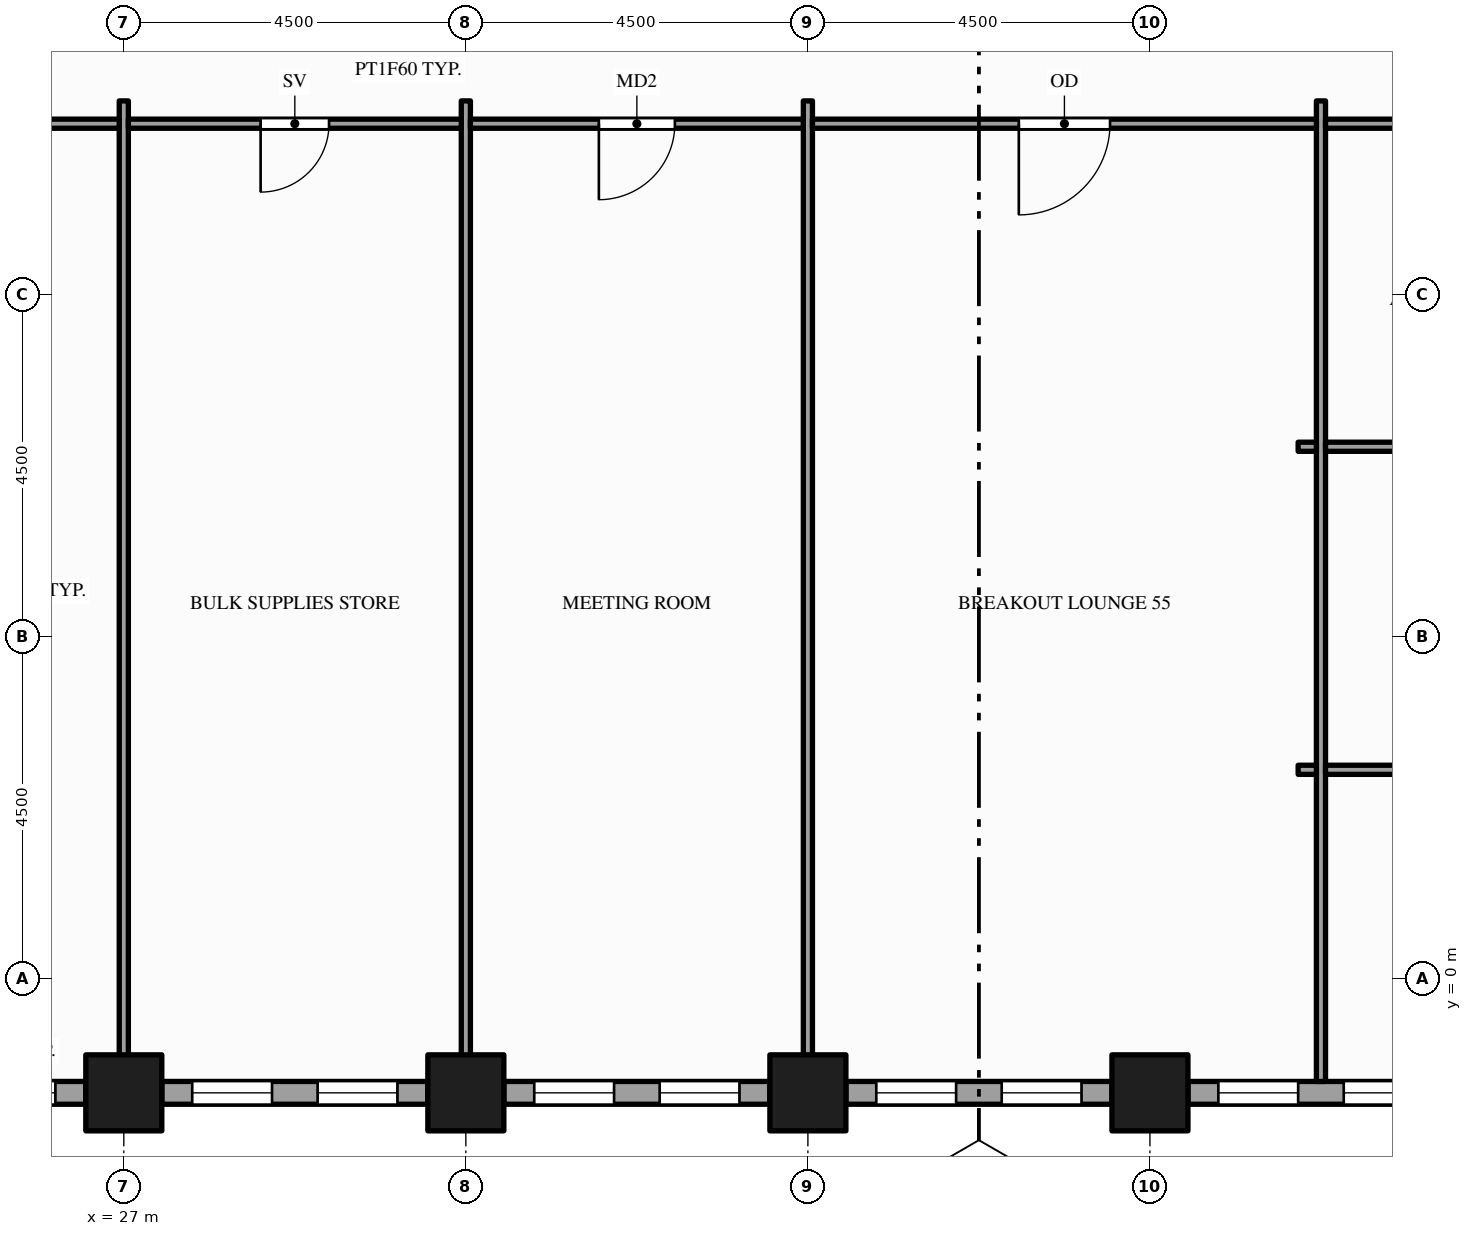
"""IFC4 building model, lengths in metres.
Left out: names, types, materials, properties, quantities, classifications, styles, units other than length and angle.
Written with IfcOpenShell. Run it as: python <this file> out.ifc"""

import sys

from ifc_helpers import new_model, si_unit, direction, frame, frame_2d, origin, origin_2d, place, context, subcontext, project, spatial, rectangle, hollow_rectangle, extrude, element, fill, save


model = new_model("IFC4")
c1 = context("Model", 3, precision=1e-05, world=origin(), true_north=direction((0.0, 1.0)))
c2 = subcontext(c1, "Body", "Model", "MODEL_VIEW")
j1 = project(units=[si_unit("LENGTHUNIT", "METRE"), si_unit("PLANEANGLEUNIT", "RADIAN")], contexts=[c1])
p1 = place(None, origin())
s1 = spatial("IfcSite", under=j1, at=p1, CompositionType="ELEMENT")
p2 = place(p1, origin())
s2 = spatial("IfcBuilding", under=s1, at=p2, CompositionType="ELEMENT")
p3 = place(p2, frame((0.0, 0.0, 83.0)))
s3 = spatial("IfcBuildingStorey", under=s2, at=p3, CompositionType="ELEMENT", Elevation=83.0)
for number, where, z_axis, x_axis in (
    (1, (27.0, -1.5, -0.15), (0.0, 0.0, 1.0), (1.0, 0.0, 0.0)),
    (2, (31.5, -1.5, -0.15), (0.0, 0.0, 1.0), (1.0, 0.0, 0.0)),
    (3, (36.0, -1.5, -0.15), (0.0, 0.0, 1.0), (1.0, 0.0, 0.0)),
    (4, (40.5, -1.5, -0.15), (0.0, 0.0, 1.0), (1.0, 0.0, 0.0)),
):
    element("IfcColumn", number, at=place(p3, frame(where, z_axis=z_axis, x_axis=x_axis)), inside=s3, PredefinedType="COLUMN", context=c2, shape_type="SweptSolid", body=[
        extrude(hollow_rectangle(XDim=1.0, YDim=1.0, WallThickness=0.05, at=origin_2d()), origin(), (0.0, 0.0, 1.0), 4.0),
    ])
p4 = place(p3, frame((23.0, -1.5, 0.0), z_axis=(0.0, 0.0, 1.0), x_axis=(1.0, 0.0, 0.0)))
e5 = element("IfcWall", 5, at=p4, inside=s3, PredefinedType="STANDARD", context=c2, shape_type="SweptSolid", body=[
    extrude(rectangle(XDim=3.5, YDim=0.3, at=frame_2d((1.75, 0.0))), origin(), (0.0, 0.0, 1.0), 3.154),
])
p5 = place(p4, frame((0.4, 0.0, 0.9)))
e6 = element("IfcOpeningElement", 6, at=p5, cuts=e5, PredefinedType="OPENING", context=c2, shape_type="SweptSolid", body=[
    extrude(rectangle(XDim=1.05, YDim=2.0, at=frame_2d((0.525, 1.0))), frame((0.0, 0.16, 0.0), z_axis=(0.0, -1.0, 0.0), x_axis=(1.0, 0.0, 0.0)), (0.0, 0.0, 1.0), 0.32),
])
p6 = place(p4, frame((2.05, 0.0, 0.9)))
e7 = element("IfcOpeningElement", 7, at=p6, cuts=e5, PredefinedType="OPENING", context=c2, shape_type="SweptSolid", body=[
    extrude(rectangle(XDim=1.05, YDim=2.0, at=frame_2d((0.525, 1.0))), frame((0.0, 0.16, 0.0), z_axis=(0.0, -1.0, 0.0), x_axis=(1.0, 0.0, 0.0)), (0.0, 0.0, 1.0), 0.32),
])
p7 = place(p3, frame((27.5, -1.5, 0.0), z_axis=(0.0, 0.0, 1.0), x_axis=(1.0, 0.0, 0.0)))
e8 = element("IfcWall", 8, at=p7, inside=s3, PredefinedType="STANDARD", context=c2, shape_type="SweptSolid", body=[
    extrude(rectangle(XDim=3.5, YDim=0.3, at=frame_2d((1.75, 0.0))), origin(), (0.0, 0.0, 1.0), 3.154),
])
p8 = place(p7, frame((0.4, 0.0, 0.9)))
e9 = element("IfcOpeningElement", 9, at=p8, cuts=e8, PredefinedType="OPENING", context=c2, shape_type="SweptSolid", body=[
    extrude(rectangle(XDim=1.05, YDim=2.0, at=frame_2d((0.525, 1.0))), frame((0.0, 0.16, 0.0), z_axis=(0.0, -1.0, 0.0), x_axis=(1.0, 0.0, 0.0)), (0.0, 0.0, 1.0), 0.32),
])
p9 = place(p7, frame((2.05, 0.0, 0.9)))
e10 = element("IfcOpeningElement", 10, at=p9, cuts=e8, PredefinedType="OPENING", context=c2, shape_type="SweptSolid", body=[
    extrude(rectangle(XDim=1.05, YDim=2.0, at=frame_2d((0.525, 1.0))), frame((0.0, 0.16, 0.0), z_axis=(0.0, -1.0, 0.0), x_axis=(1.0, 0.0, 0.0)), (0.0, 0.0, 1.0), 0.32),
])
p10 = place(p3, frame((32.0, -1.5, 0.0), z_axis=(0.0, 0.0, 1.0), x_axis=(1.0, 0.0, 0.0)))
e11 = element("IfcWall", 11, at=p10, inside=s3, PredefinedType="STANDARD", context=c2, shape_type="SweptSolid", body=[
    extrude(rectangle(XDim=3.5, YDim=0.3, at=frame_2d((1.75, 0.0))), origin(), (0.0, 0.0, 1.0), 3.154),
])
p11 = place(p10, frame((0.4, 0.0, 0.9)))
e12 = element("IfcOpeningElement", 12, at=p11, cuts=e11, PredefinedType="OPENING", context=c2, shape_type="SweptSolid", body=[
    extrude(rectangle(XDim=1.05, YDim=2.0, at=frame_2d((0.525, 1.0))), frame((0.0, 0.16, 0.0), z_axis=(0.0, -1.0, 0.0), x_axis=(1.0, 0.0, 0.0)), (0.0, 0.0, 1.0), 0.32),
])
p12 = place(p10, frame((2.05, 0.0, 0.9)))
e13 = element("IfcOpeningElement", 13, at=p12, cuts=e11, PredefinedType="OPENING", context=c2, shape_type="SweptSolid", body=[
    extrude(rectangle(XDim=1.05, YDim=2.0, at=frame_2d((0.525, 1.0))), frame((0.0, 0.16, 0.0), z_axis=(0.0, -1.0, 0.0), x_axis=(1.0, 0.0, 0.0)), (0.0, 0.0, 1.0), 0.32),
])
p13 = place(p3, frame((36.5, -1.5, 0.0), z_axis=(0.0, 0.0, 1.0), x_axis=(1.0, 0.0, 0.0)))
e14 = element("IfcWall", 14, at=p13, inside=s3, PredefinedType="STANDARD", context=c2, shape_type="SweptSolid", body=[
    extrude(rectangle(XDim=3.5, YDim=0.3, at=frame_2d((1.75, 0.0))), origin(), (0.0, 0.0, 1.0), 3.154),
])
p14 = place(p13, frame((0.4, 0.0, 0.9)))
e15 = element("IfcOpeningElement", 15, at=p14, cuts=e14, PredefinedType="OPENING", context=c2, shape_type="SweptSolid", body=[
    extrude(rectangle(XDim=1.05, YDim=2.0, at=frame_2d((0.525, 1.0))), frame((0.0, 0.16, 0.0), z_axis=(0.0, -1.0, 0.0), x_axis=(1.0, 0.0, 0.0)), (0.0, 0.0, 1.0), 0.32),
])
p15 = place(p13, frame((2.05, 0.0, 0.9)))
e16 = element("IfcOpeningElement", 16, at=p15, cuts=e14, PredefinedType="OPENING", context=c2, shape_type="SweptSolid", body=[
    extrude(rectangle(XDim=1.05, YDim=2.0, at=frame_2d((0.525, 1.0))), frame((0.0, 0.16, 0.0), z_axis=(0.0, -1.0, 0.0), x_axis=(1.0, 0.0, 0.0)), (0.0, 0.0, 1.0), 0.32),
])
p16 = place(p3, frame((41.0, -1.5, 0.0), z_axis=(0.0, 0.0, 1.0), x_axis=(1.0, 0.0, 0.0)))
e17 = element("IfcWall", 17, at=p16, inside=s3, PredefinedType="STANDARD", context=c2, shape_type="SweptSolid", body=[
    extrude(rectangle(XDim=3.5, YDim=0.3, at=frame_2d((1.75, 0.0))), origin(), (0.0, 0.0, 1.0), 3.154),
])
p17 = place(p16, frame((0.4, 0.0, 0.9)))
e18 = element("IfcOpeningElement", 18, at=p17, cuts=e17, PredefinedType="OPENING", context=c2, shape_type="SweptSolid", body=[
    extrude(rectangle(XDim=1.05, YDim=2.0, at=frame_2d((0.525, 1.0))), frame((0.0, 0.16, 0.0), z_axis=(0.0, -1.0, 0.0), x_axis=(1.0, 0.0, 0.0)), (0.0, 0.0, 1.0), 0.32),
])
p18 = place(p16, frame((2.05, 0.0, 0.9)))
e19 = element("IfcOpeningElement", 19, at=p18, cuts=e17, PredefinedType="OPENING", context=c2, shape_type="SweptSolid", body=[
    extrude(rectangle(XDim=1.05, YDim=2.0, at=frame_2d((0.525, 1.0))), frame((0.0, 0.16, 0.0), z_axis=(0.0, -1.0, 0.0), x_axis=(1.0, 0.0, 0.0)), (0.0, 0.0, 1.0), 0.32),
])
for number, where, z_axis, x_axis in (
    (20, (27.0, -1.35, 0.0), (0.0, 0.0, 1.0), (0.0, 1.0, 0.0)),
    (21, (31.5, -1.35, 0.0), (0.0, 0.0, 1.0), (0.0, 1.0, 0.0)),
    (22, (36.0, -1.35, 0.0), (0.0, 0.0, 1.0), (0.0, 1.0, 0.0)),
    (23, (42.75, -1.35, 0.0), (0.0, 0.0, 1.0), (0.0, 1.0, 0.0)),
):
    element("IfcWall", number, at=place(p3, frame(where, z_axis=z_axis, x_axis=x_axis)), inside=s3, PredefinedType="PARTITIONING", context=c2, shape_type="SweptSolid", body=[
        extrude(rectangle(XDim=12.9, YDim=0.12, at=frame_2d((6.45, 0.0))), origin(), (0.0, 0.0, 1.0), 2.938),
    ])
p19 = place(p3, frame((42.45, 2.75, 0.0), z_axis=(0.0, 0.0, 1.0), x_axis=(1.0, 0.0, 0.0)))
e24 = element("IfcWall", 24, at=p19, inside=s3, PredefinedType="PARTITIONING", context=c2, shape_type="SweptSolid", body=[
    extrude(rectangle(XDim=0.24, YDim=0.12, at=frame_2d((0.12, 0.0))), origin(), (0.0, 0.0, 1.0), 2.938),
])
p20 = place(p3, frame((42.81, 2.75, 0.0), z_axis=(0.0, 0.0, 1.0), x_axis=(1.0, 0.0, 0.0)))
e25 = element("IfcWall", 25, at=p20, inside=s3, PredefinedType="PARTITIONING", context=c2, shape_type="SweptSolid", body=[
    extrude(rectangle(XDim=4.38, YDim=0.12, at=frame_2d((2.19, 0.0))), origin(), (0.0, 0.0, 1.0), 2.938),
])
p21 = place(p3, frame((42.45, 7.0, 0.0), z_axis=(0.0, 0.0, 1.0), x_axis=(1.0, 0.0, 0.0)))
e26 = element("IfcWall", 26, at=p21, inside=s3, PredefinedType="PARTITIONING", context=c2, shape_type="SweptSolid", body=[
    extrude(rectangle(XDim=0.24, YDim=0.12, at=frame_2d((0.12, 0.0))), origin(), (0.0, 0.0, 1.0), 2.938),
])
p22 = place(p3, frame((42.81, 7.0, 0.0), z_axis=(0.0, 0.0, 1.0), x_axis=(1.0, 0.0, 0.0)))
e27 = element("IfcWall", 27, at=p22, inside=s3, PredefinedType="PARTITIONING", context=c2, shape_type="SweptSolid", body=[
    extrude(rectangle(XDim=4.38, YDim=0.12, at=frame_2d((2.19, 0.0))), origin(), (0.0, 0.0, 1.0), 2.938),
])
p23 = place(p3, frame((22.56, 11.25, 0.0), z_axis=(0.0, 0.0, 1.0), x_axis=(1.0, 0.0, 0.0)))
e28 = element("IfcWall", 28, at=p23, inside=s3, PredefinedType="PARTITIONING", context=c2, shape_type="SweptSolid", body=[
    extrude(rectangle(XDim=4.38, YDim=0.12, at=frame_2d((2.19, 0.0))), origin(), (0.0, 0.0, 1.0), 2.76),
])
p24 = place(p23, frame((1.69, 0.0, 0.0)))
e29 = element("IfcOpeningElement", 29, at=p24, cuts=e28, PredefinedType="OPENING", context=c2, shape_type="SweptSolid", body=[
    extrude(rectangle(XDim=1.0, YDim=2.1, at=frame_2d((0.5, 1.05))), frame((0.0, 0.07, 0.0), z_axis=(0.0, -1.0, 0.0), x_axis=(1.0, 0.0, 0.0)), (0.0, 0.0, 1.0), 0.14),
])
p25 = place(p3, frame((27.06, 11.25, 0.0), z_axis=(0.0, 0.0, 1.0), x_axis=(1.0, 0.0, 0.0)))
e30 = element("IfcWall", 30, at=p25, inside=s3, PredefinedType="PARTITIONING", context=c2, shape_type="SweptSolid", body=[
    extrude(rectangle(XDim=4.38, YDim=0.12, at=frame_2d((2.19, 0.0))), origin(), (0.0, 0.0, 1.0), 2.938),
])
p26 = place(p25, frame((1.74, 0.0, 0.0)))
e31 = element("IfcOpeningElement", 31, at=p26, cuts=e30, PredefinedType="OPENING", context=c2, shape_type="SweptSolid", body=[
    extrude(rectangle(XDim=0.9, YDim=2.1, at=frame_2d((0.45, 1.05))), frame((0.0, 0.07, 0.0), z_axis=(0.0, -1.0, 0.0), x_axis=(1.0, 0.0, 0.0)), (0.0, 0.0, 1.0), 0.14),
])
p27 = place(p3, frame((31.56, 11.25, 0.0), z_axis=(0.0, 0.0, 1.0), x_axis=(1.0, 0.0, 0.0)))
e32 = element("IfcWall", 32, at=p27, inside=s3, PredefinedType="PARTITIONING", context=c2, shape_type="SweptSolid", body=[
    extrude(rectangle(XDim=4.38, YDim=0.12, at=frame_2d((2.19, 0.0))), origin(), (0.0, 0.0, 1.0), 2.938),
])
p28 = place(p27, frame((1.69, 0.0, 0.0)))
e33 = element("IfcOpeningElement", 33, at=p28, cuts=e32, PredefinedType="OPENING", context=c2, shape_type="SweptSolid", body=[
    extrude(rectangle(XDim=1.0, YDim=2.1, at=frame_2d((0.5, 1.05))), frame((0.0, 0.07, 0.0), z_axis=(0.0, -1.0, 0.0), x_axis=(1.0, 0.0, 0.0)), (0.0, 0.0, 1.0), 0.14),
])
p29 = place(p3, frame((36.06, 11.25, 0.0), z_axis=(0.0, 0.0, 1.0), x_axis=(1.0, 0.0, 0.0)))
e34 = element("IfcWall", 34, at=p29, inside=s3, PredefinedType="PARTITIONING", context=c2, shape_type="SweptSolid", body=[
    extrude(rectangle(XDim=6.63, YDim=0.12, at=frame_2d((3.315, 0.0))), origin(), (0.0, 0.0, 1.0), 2.938),
])
p30 = place(p29, frame((2.715, 0.0, 0.0)))
e35 = element("IfcOpeningElement", 35, at=p30, cuts=e34, PredefinedType="OPENING", context=c2, shape_type="SweptSolid", body=[
    extrude(rectangle(XDim=1.2, YDim=2.1, at=frame_2d((0.6, 1.05))), frame((0.0, 0.07, 0.0), z_axis=(0.0, -1.0, 0.0), x_axis=(1.0, 0.0, 0.0)), (0.0, 0.0, 1.0), 0.14),
])
p31 = place(p3, frame((42.81, 11.25, 0.0), z_axis=(0.0, 0.0, 1.0), x_axis=(1.0, 0.0, 0.0)))
e36 = element("IfcWall", 36, at=p31, inside=s3, PredefinedType="PARTITIONING", context=c2, shape_type="SweptSolid", body=[
    extrude(rectangle(XDim=4.38, YDim=0.12, at=frame_2d((2.19, 0.0))), origin(), (0.0, 0.0, 1.0), 2.938),
])
p32 = place(p6, origin())
e37 = element("IfcWindow", 37, at=p32, inside=s3, PartitioningType="SINGLE_PANEL", PredefinedType="WINDOW", context=c2, shape_type="SweptSolid", body=[
    extrude(rectangle(XDim=1.05, YDim=2.0, at=frame_2d((0.525, 1.0))), frame((0.0, 0.03, 0.0), z_axis=(0.0, -1.0, 0.0), x_axis=(1.0, 0.0, 0.0)), (0.0, 0.0, 1.0), 0.06),
])
fill(e7, e37)
p33 = place(p8, origin())
e38 = element("IfcWindow", 38, at=p33, inside=s3, PartitioningType="SINGLE_PANEL", PredefinedType="WINDOW", context=c2, shape_type="SweptSolid", body=[
    extrude(rectangle(XDim=1.05, YDim=2.0, at=frame_2d((0.525, 1.0))), frame((0.0, 0.03, 0.0), z_axis=(0.0, -1.0, 0.0), x_axis=(1.0, 0.0, 0.0)), (0.0, 0.0, 1.0), 0.06),
])
fill(e9, e38)
p34 = place(p9, origin())
e39 = element("IfcWindow", 39, at=p34, inside=s3, PartitioningType="SINGLE_PANEL", PredefinedType="WINDOW", context=c2, shape_type="SweptSolid", body=[
    extrude(rectangle(XDim=1.05, YDim=2.0, at=frame_2d((0.525, 1.0))), frame((0.0, 0.03, 0.0), z_axis=(0.0, -1.0, 0.0), x_axis=(1.0, 0.0, 0.0)), (0.0, 0.0, 1.0), 0.06),
])
fill(e10, e39)
p35 = place(p11, origin())
e40 = element("IfcWindow", 40, at=p35, inside=s3, PartitioningType="SINGLE_PANEL", PredefinedType="WINDOW", context=c2, shape_type="SweptSolid", body=[
    extrude(rectangle(XDim=1.05, YDim=2.0, at=frame_2d((0.525, 1.0))), frame((0.0, 0.03, 0.0), z_axis=(0.0, -1.0, 0.0), x_axis=(1.0, 0.0, 0.0)), (0.0, 0.0, 1.0), 0.06),
])
fill(e12, e40)
p36 = place(p12, origin())
e41 = element("IfcWindow", 41, at=p36, inside=s3, PartitioningType="SINGLE_PANEL", PredefinedType="WINDOW", context=c2, shape_type="SweptSolid", body=[
    extrude(rectangle(XDim=1.05, YDim=2.0, at=frame_2d((0.525, 1.0))), frame((0.0, 0.03, 0.0), z_axis=(0.0, -1.0, 0.0), x_axis=(1.0, 0.0, 0.0)), (0.0, 0.0, 1.0), 0.06),
])
fill(e13, e41)
p37 = place(p14, origin())
e42 = element("IfcWindow", 42, at=p37, inside=s3, PartitioningType="SINGLE_PANEL", PredefinedType="WINDOW", context=c2, shape_type="SweptSolid", body=[
    extrude(rectangle(XDim=1.05, YDim=2.0, at=frame_2d((0.525, 1.0))), frame((0.0, 0.03, 0.0), z_axis=(0.0, -1.0, 0.0), x_axis=(1.0, 0.0, 0.0)), (0.0, 0.0, 1.0), 0.06),
])
fill(e15, e42)
p38 = place(p15, origin())
e43 = element("IfcWindow", 43, at=p38, inside=s3, PartitioningType="SINGLE_PANEL", PredefinedType="WINDOW", context=c2, shape_type="SweptSolid", body=[
    extrude(rectangle(XDim=1.05, YDim=2.0, at=frame_2d((0.525, 1.0))), frame((0.0, 0.03, 0.0), z_axis=(0.0, -1.0, 0.0), x_axis=(1.0, 0.0, 0.0)), (0.0, 0.0, 1.0), 0.06),
])
fill(e16, e43)
p39 = place(p17, origin())
e44 = element("IfcWindow", 44, at=p39, inside=s3, PartitioningType="SINGLE_PANEL", PredefinedType="WINDOW", context=c2, shape_type="SweptSolid", body=[
    extrude(rectangle(XDim=1.05, YDim=2.0, at=frame_2d((0.525, 1.0))), frame((0.0, 0.03, 0.0), z_axis=(0.0, -1.0, 0.0), x_axis=(1.0, 0.0, 0.0)), (0.0, 0.0, 1.0), 0.06),
])
fill(e18, e44)
p40 = place(p18, origin())
e45 = element("IfcWindow", 45, at=p40, inside=s3, PartitioningType="SINGLE_PANEL", PredefinedType="WINDOW", context=c2, shape_type="SweptSolid", body=[
    extrude(rectangle(XDim=1.05, YDim=2.0, at=frame_2d((0.525, 1.0))), frame((0.0, 0.03, 0.0), z_axis=(0.0, -1.0, 0.0), x_axis=(1.0, 0.0, 0.0)), (0.0, 0.0, 1.0), 0.06),
])
fill(e19, e45)
p41 = place(p26, origin())
e46 = element("IfcDoor", 46, at=p41, inside=s3, OperationType="SINGLE_SWING_LEFT", PredefinedType="DOOR", context=c2, shape_type="SweptSolid", body=[
    extrude(rectangle(XDim=0.9, YDim=2.1, at=frame_2d((0.45, 1.05))), frame((0.0, 0.025, 0.0), z_axis=(0.0, -1.0, 0.0), x_axis=(1.0, 0.0, 0.0)), (0.0, 0.0, 1.0), 0.05),
])
fill(e31, e46)
p42 = place(p28, origin())
e47 = element("IfcDoor", 47, at=p42, inside=s3, OperationType="SINGLE_SWING_LEFT", PredefinedType="DOOR", context=c2, shape_type="SweptSolid", body=[
    extrude(rectangle(XDim=1.0, YDim=2.1, at=frame_2d((0.5, 1.05))), frame((0.0, 0.025, 0.0), z_axis=(0.0, -1.0, 0.0), x_axis=(1.0, 0.0, 0.0)), (0.0, 0.0, 1.0), 0.05),
])
fill(e33, e47)
p43 = place(p30, origin())
e48 = element("IfcDoor", 48, at=p43, inside=s3, OperationType="SINGLE_SWING_LEFT", PredefinedType="DOOR", context=c2, shape_type="SweptSolid", body=[
    extrude(rectangle(XDim=1.2, YDim=2.1, at=frame_2d((0.6, 1.05))), frame((0.0, 0.025, 0.0), z_axis=(0.0, -1.0, 0.0), x_axis=(1.0, 0.0, 0.0)), (0.0, 0.0, 1.0), 0.05),
])
fill(e35, e48)
save(model, sys.argv[1])
